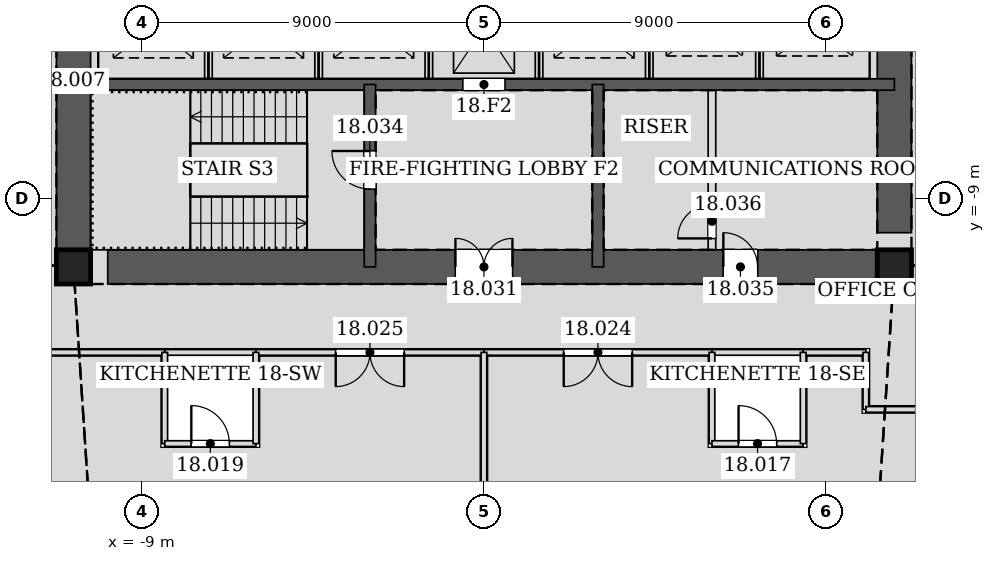
"""IFC4 building model, lengths in metres.
Left out: names, types, materials, properties, quantities, classifications, styles, units other than length and angle.
Written with IfcOpenShell. Run it as: python <this file> out.ifc"""

import sys

from ifc_helpers import new_model, si_unit, direction, frame, frame_2d, origin, origin_2d, place, context, subcontext, project, spatial, rectangle, hollow_rectangle, extrude, element, fill, save


model = new_model("IFC4")
c1 = context("Model", 3, precision=1e-05, world=origin(), true_north=direction((0.0, 1.0)))
c2 = subcontext(c1, "Body", "Model", "MODEL_VIEW")
j1 = project(units=[si_unit("LENGTHUNIT", "METRE"), si_unit("PLANEANGLEUNIT", "RADIAN")], contexts=[c1])
p1 = place(None, origin())
s1 = spatial("IfcSite", under=j1, at=p1, CompositionType="ELEMENT")
p2 = place(p1, origin())
s2 = spatial("IfcBuilding", under=s1, at=p2, CompositionType="ELEMENT")
p3 = place(p2, frame((0.0, 0.0, 83.4)))
s3 = spatial("IfcBuildingStorey", under=s2, at=p3, CompositionType="ELEMENT", Elevation=83.4)
for number, where, z_axis, x_axis in (
    (1, (-10.8, -10.8, 0.0), (0.0, 0.0, 1.0), (1.0, 0.0, 0.0)),
    (2, (10.8, -10.8, 0.0), (0.0, 0.0, 1.0), (1.0, 0.0, 0.0)),
):
    element("IfcColumn", number, at=place(p3, frame(where, z_axis=z_axis, x_axis=x_axis)), inside=s3, PredefinedType="COLUMN", context=c2, shape_type="SweptSolid", body=[
        extrude(hollow_rectangle(XDim=0.9, YDim=0.9, WallThickness=0.06, at=origin_2d()), origin(), (0.0, 0.0, 1.0), 4.2),
    ])
p4 = place(p3, frame((-10.8, -10.8, 0.0), z_axis=(0.0, 0.0, 1.0), x_axis=(1.0, 0.0, 0.0)))
e3 = element("IfcWall", 3, at=p4, inside=s3, PredefinedType="SOLIDWALL", context=c2, shape_type="SweptSolid", body=[
    extrude(rectangle(XDim=21.6, YDim=0.9, at=frame_2d((10.8, 0.0))), origin(), (0.0, 0.0, 1.0), 4.2),
])
p5 = place(p4, frame((10.05, 0.0, 0.0)))
e4 = element("IfcOpeningElement", 4, at=p5, cuts=e3, PredefinedType="OPENING", context=c2, shape_type="SweptSolid", body=[
    extrude(rectangle(XDim=1.5, YDim=2.1, at=frame_2d((0.75, 1.05))), frame((0.0, 0.46, 0.0), z_axis=(0.0, -1.0, 0.0), x_axis=(1.0, 0.0, 0.0)), (0.0, 0.0, 1.0), 0.92),
])
p6 = place(p4, frame((17.1, 0.0, 0.0)))
e5 = element("IfcOpeningElement", 5, at=p6, cuts=e3, PredefinedType="OPENING", context=c2, shape_type="SweptSolid", body=[
    extrude(rectangle(XDim=0.9, YDim=2.1, at=frame_2d((0.45, 1.05))), frame((0.0, 0.46, 0.0), z_axis=(0.0, -1.0, 0.0), x_axis=(1.0, 0.0, 0.0)), (0.0, 0.0, 1.0), 0.92),
])
p7 = place(p3, frame((10.8, -10.8, 0.0), z_axis=(0.0, 0.0, 1.0), x_axis=(0.0, 1.0, 0.0)))
e6 = element("IfcWall", 6, at=p7, inside=s3, PredefinedType="SOLIDWALL", context=c2, shape_type="SweptSolid", body=[
    extrude(rectangle(XDim=21.6, YDim=0.9, at=frame_2d((10.8, 0.0))), origin(), (0.0, 0.0, 1.0), 4.2),
])
p8 = place(p7, frame((11.7, 0.0, 0.0)))
e7 = element("IfcOpeningElement", 7, at=p8, cuts=e6, PredefinedType="OPENING", context=c2, shape_type="SweptSolid", body=[
    extrude(rectangle(XDim=1.2, YDim=2.1, at=frame_2d((0.6, 1.05))), frame((0.0, 0.46, 0.0), z_axis=(0.0, -1.0, 0.0), x_axis=(1.0, 0.0, 0.0)), (0.0, 0.0, 1.0), 0.92),
])
p9 = place(p7, frame((8.7, 0.0, 0.0)))
e8 = element("IfcOpeningElement", 8, at=p9, cuts=e6, PredefinedType="OPENING", context=c2, shape_type="SweptSolid", body=[
    extrude(rectangle(XDim=1.2, YDim=2.1, at=frame_2d((0.6, 1.05))), frame((0.0, 0.46, 0.0), z_axis=(0.0, -1.0, 0.0), x_axis=(1.0, 0.0, 0.0)), (0.0, 0.0, 1.0), 0.92),
])
p10 = place(p3, frame((-10.8, 10.8, 0.0), z_axis=(0.0, 0.0, 1.0), x_axis=(0.0, -1.0, 0.0)))
e9 = element("IfcWall", 9, at=p10, inside=s3, PredefinedType="SOLIDWALL", context=c2, shape_type="SweptSolid", body=[
    extrude(rectangle(XDim=21.6, YDim=0.9, at=frame_2d((10.8, 0.0))), origin(), (0.0, 0.0, 1.0), 4.2),
])
p11 = place(p10, frame((8.7, 0.0, 0.0)))
e10 = element("IfcOpeningElement", 10, at=p11, cuts=e9, PredefinedType="OPENING", context=c2, shape_type="SweptSolid", body=[
    extrude(rectangle(XDim=1.2, YDim=2.1, at=frame_2d((0.6, 1.05))), frame((0.0, 0.46, 0.0), z_axis=(0.0, -1.0, 0.0), x_axis=(1.0, 0.0, 0.0)), (0.0, 0.0, 1.0), 0.92),
])
p12 = place(p10, frame((11.7, 0.0, 0.0)))
e11 = element("IfcOpeningElement", 11, at=p12, cuts=e9, PredefinedType="OPENING", context=c2, shape_type="SweptSolid", body=[
    extrude(rectangle(XDim=1.2, YDim=2.1, at=frame_2d((0.6, 1.05))), frame((0.0, 0.46, 0.0), z_axis=(0.0, -1.0, 0.0), x_axis=(1.0, 0.0, 0.0)), (0.0, 0.0, 1.0), 0.92),
])
p13 = place(p3, frame((-10.8, -6.0, 0.0), z_axis=(0.0, 0.0, 1.0), x_axis=(1.0, 0.0, 0.0)))
e12 = element("IfcWall", 12, at=p13, inside=s3, PredefinedType="SOLIDWALL", context=c2, shape_type="SweptSolid", body=[
    extrude(rectangle(XDim=21.6, YDim=0.3, at=frame_2d((10.8, 0.0))), origin(), (0.0, 0.0, 1.0), 4.2),
])
p14 = place(p13, frame((10.25, 0.0, 0.0)))
e13 = element("IfcOpeningElement", 13, at=p14, cuts=e12, PredefinedType="OPENING", context=c2, shape_type="SweptSolid", body=[
    extrude(rectangle(XDim=1.1, YDim=2.1, at=frame_2d((0.55, 1.05))), frame((0.0, 0.16, 0.0), z_axis=(0.0, -1.0, 0.0), x_axis=(1.0, 0.0, 0.0)), (0.0, 0.0, 1.0), 0.32),
])
p15 = place(p3, frame((-3.0, -6.0, 0.0), z_axis=(0.0, 0.0, 1.0), x_axis=(0.0, -1.0, 0.0)))
e14 = element("IfcWall", 14, at=p15, inside=s3, PredefinedType="SOLIDWALL", context=c2, shape_type="SweptSolid", body=[
    extrude(rectangle(XDim=4.8, YDim=0.3, at=frame_2d((2.4, 0.0))), origin(), (0.0, 0.0, 1.0), 4.2),
])
p16 = place(p15, frame((1.75, 0.0, 0.0)))
e15 = element("IfcOpeningElement", 15, at=p16, cuts=e14, PredefinedType="OPENING", context=c2, shape_type="SweptSolid", body=[
    extrude(rectangle(XDim=1.0, YDim=2.1, at=frame_2d((0.5, 1.05))), frame((0.0, 0.16, 0.0), z_axis=(0.0, -1.0, 0.0), x_axis=(1.0, 0.0, 0.0)), (0.0, 0.0, 1.0), 0.32),
])
p17 = place(p3, frame((3.0, -6.0, 0.0), z_axis=(0.0, 0.0, 1.0), x_axis=(0.0, -1.0, 0.0)))
e16 = element("IfcWall", 16, at=p17, inside=s3, PredefinedType="SOLIDWALL", context=c2, shape_type="SweptSolid", body=[
    extrude(rectangle(XDim=4.8, YDim=0.3, at=frame_2d((2.4, 0.0))), origin(), (0.0, 0.0, 1.0), 4.2),
])
for number, where, z_axis, x_axis in (
    (17, (5.999, -13.05, 0.0), (0.0, 0.0, 1.0), (1.0, 0.0, 0.0)),
    (18, (-8.401, -13.05, 0.0), (0.0, 0.0, 1.0), (1.0, 0.0, 0.0)),
):
    element("IfcWall", number, at=place(p3, frame(where, z_axis=z_axis, x_axis=x_axis)), inside=s3, PredefinedType="PARTITIONING", context=c2, shape_type="SweptSolid", body=[
        extrude(rectangle(XDim=2.402, YDim=0.15, at=frame_2d((1.201, 0.0))), origin(), (0.0, 0.0, 1.0), 4.035),
    ])
p18 = place(p3, frame((-0.001, -13.05, 0.0), z_axis=(0.0, 0.0, 1.0), x_axis=(1.0, 0.0, 0.0)))
e19 = element("IfcWall", 19, at=p18, inside=s3, PredefinedType="PARTITIONING", context=c2, shape_type="SweptSolid", body=[
    extrude(rectangle(XDim=6.002, YDim=0.15, at=frame_2d((3.001, 0.0))), origin(), (0.0, 0.0, 1.0), 3.065),
])
p19 = place(p18, frame((2.101, 0.0, 0.0)))
e20 = element("IfcOpeningElement", 20, at=p19, cuts=e19, PredefinedType="OPENING", context=c2, shape_type="SweptSolid", body=[
    extrude(rectangle(XDim=1.8, YDim=2.4, at=frame_2d((0.9, 1.2))), frame((0.0, 0.085, 0.0), z_axis=(0.0, -1.0, 0.0), x_axis=(1.0, 0.0, 0.0)), (0.0, 0.0, 1.0), 0.17),
])
p20 = place(p3, frame((8.399, -13.05, 0.0), z_axis=(0.0, 0.0, 1.0), x_axis=(1.0, 0.0, 0.0)))
e21 = element("IfcWall", 21, at=p20, inside=s3, PredefinedType="PARTITIONING", context=c2, shape_type="SweptSolid", body=[
    extrude(rectangle(XDim=1.651, YDim=0.15, at=frame_2d((0.826, 0.0))), origin(), (0.0, 0.0, 1.0), 4.035),
])
p21 = place(p3, frame((10.05, -13.05, 0.0), z_axis=(0.0, 0.0, 1.0), x_axis=(0.0, -1.0, 0.0)))
e22 = element("IfcWall", 22, at=p21, inside=s3, PredefinedType="PARTITIONING", context=c2, shape_type="SweptSolid", body=[
    extrude(rectangle(XDim=1.5, YDim=0.15, at=frame_2d((0.75, 0.0))), origin(), (0.0, 0.0, 1.0), 3.492),
])
p22 = place(p3, frame((10.05, -14.55, 0.0), z_axis=(0.0, 0.0, 1.0), x_axis=(1.0, 0.0, 0.0)))
e23 = element("IfcWall", 23, at=p22, inside=s3, PredefinedType="PARTITIONING", context=c2, shape_type="SweptSolid", body=[
    extrude(rectangle(XDim=4.5, YDim=0.15, at=frame_2d((2.25, 0.0))), origin(), (0.0, 0.0, 1.0), 3.014),
])
p23 = place(p3, frame((-13.05, -13.05, 0.0), z_axis=(0.0, 0.0, 1.0), x_axis=(1.0, 0.0, 0.0)))
e24 = element("IfcWall", 24, at=p23, inside=s3, PredefinedType="PARTITIONING", context=c2, shape_type="SweptSolid", body=[
    extrude(rectangle(XDim=4.651, YDim=0.15, at=frame_2d((2.326, 0.0))), origin(), (0.0, 0.0, 1.0), 3.014),
])
p24 = place(p3, frame((-6.001, -13.05, 0.0), z_axis=(0.0, 0.0, 1.0), x_axis=(1.0, 0.0, 0.0)))
e25 = element("IfcWall", 25, at=p24, inside=s3, PredefinedType="PARTITIONING", context=c2, shape_type="SweptSolid", body=[
    extrude(rectangle(XDim=6.002, YDim=0.15, at=frame_2d((3.001, 0.0))), origin(), (0.0, 0.0, 1.0), 3.065),
])
p25 = place(p24, frame((2.101, 0.0, 0.0)))
e26 = element("IfcOpeningElement", 26, at=p25, cuts=e25, PredefinedType="OPENING", context=c2, shape_type="SweptSolid", body=[
    extrude(rectangle(XDim=1.8, YDim=2.4, at=frame_2d((0.9, 1.2))), frame((0.0, 0.085, 0.0), z_axis=(0.0, -1.0, 0.0), x_axis=(1.0, 0.0, 0.0)), (0.0, 0.0, 1.0), 0.17),
])
p26 = place(p3, frame((6.0, -13.05, 0.0), z_axis=(0.0, 0.0, 1.0), x_axis=(0.0, -1.0, 0.0)))
e27 = element("IfcWall", 27, at=p26, inside=s3, PredefinedType="PARTITIONING", context=c2, shape_type="SweptSolid", body=[
    extrude(rectangle(XDim=2.4, YDim=0.15, at=frame_2d((1.2, 0.0))), origin(), (0.0, 0.0, 1.0), 3.492),
])
p27 = place(p3, frame((6.0, -15.45, 0.0), z_axis=(0.0, 0.0, 1.0), x_axis=(1.0, 0.0, 0.0)))
e28 = element("IfcWall", 28, at=p27, inside=s3, PredefinedType="PARTITIONING", context=c2, shape_type="SweptSolid", body=[
    extrude(rectangle(XDim=2.4, YDim=0.15, at=frame_2d((1.2, 0.0))), origin(), (0.0, 0.0, 1.0), 4.035),
])
p28 = place(p27, frame((0.7, 0.0, 0.0)))
e29 = element("IfcOpeningElement", 29, at=p28, cuts=e28, PredefinedType="OPENING", context=c2, shape_type="SweptSolid", body=[
    extrude(rectangle(XDim=1.0, YDim=2.1, at=frame_2d((0.5, 1.05))), frame((0.0, 0.085, 0.0), z_axis=(0.0, -1.0, 0.0), x_axis=(1.0, 0.0, 0.0)), (0.0, 0.0, 1.0), 0.17),
])
for number, where, z_axis, x_axis in (
    (30, (8.4, -15.45, 0.0), (0.0, 0.0, 1.0), (0.0, 1.0, 0.0)),
    (31, (-8.4, -13.05, 0.0), (0.0, 0.0, 1.0), (0.0, -1.0, 0.0)),
):
    element("IfcWall", number, at=place(p3, frame(where, z_axis=z_axis, x_axis=x_axis)), inside=s3, PredefinedType="PARTITIONING", context=c2, shape_type="SweptSolid", body=[
        extrude(rectangle(XDim=2.4, YDim=0.15, at=frame_2d((1.2, 0.0))), origin(), (0.0, 0.0, 1.0), 3.492),
    ])
p29 = place(p3, frame((-8.4, -15.45, 0.0), z_axis=(0.0, 0.0, 1.0), x_axis=(1.0, 0.0, 0.0)))
e32 = element("IfcWall", 32, at=p29, inside=s3, PredefinedType="PARTITIONING", context=c2, shape_type="SweptSolid", body=[
    extrude(rectangle(XDim=2.4, YDim=0.15, at=frame_2d((1.2, 0.0))), origin(), (0.0, 0.0, 1.0), 4.035),
])
p30 = place(p29, frame((0.7, 0.0, 0.0)))
e33 = element("IfcOpeningElement", 33, at=p30, cuts=e32, PredefinedType="OPENING", context=c2, shape_type="SweptSolid", body=[
    extrude(rectangle(XDim=1.0, YDim=2.1, at=frame_2d((0.5, 1.05))), frame((0.0, 0.085, 0.0), z_axis=(0.0, -1.0, 0.0), x_axis=(1.0, 0.0, 0.0)), (0.0, 0.0, 1.0), 0.17),
])
p31 = place(p3, frame((-6.0, -15.45, 0.0), z_axis=(0.0, 0.0, 1.0), x_axis=(0.0, 1.0, 0.0)))
e34 = element("IfcWall", 34, at=p31, inside=s3, PredefinedType="PARTITIONING", context=c2, shape_type="SweptSolid", body=[
    extrude(rectangle(XDim=2.4, YDim=0.15, at=frame_2d((1.2, 0.0))), origin(), (0.0, 0.0, 1.0), 3.492),
])
p32 = place(p3, frame((0.0, -13.05, 0.0), z_axis=(0.0, 0.0, 1.0), x_axis=(0.0, -1.0, 0.0)))
e35 = element("IfcWall", 35, at=p32, inside=s3, PredefinedType="PARTITIONING", context=c2, shape_type="SweptSolid", body=[
    extrude(rectangle(XDim=11.417, YDim=0.15, at=frame_2d((5.709, 0.0))), origin(), (0.0, 0.0, 1.0), 3.065),
])
for number, where, z_axis, x_axis in (
    (36, (-7.25, -5.85, 0.0), (0.0, 0.0, 1.0), (0.0, 1.0, 0.0)),
    (37, (-4.35, -5.85, 0.0), (0.0, 0.0, 1.0), (0.0, 1.0, 0.0)),
    (38, (-1.45, -5.85, 0.0), (0.0, 0.0, 1.0), (0.0, 1.0, 0.0)),
    (39, (1.45, -5.85, 0.0), (0.0, 0.0, 1.0), (0.0, 1.0, 0.0)),
    (40, (4.35, -5.85, 0.0), (0.0, 0.0, 1.0), (0.0, 1.0, 0.0)),
    (41, (7.25, -5.85, 0.0), (0.0, 0.0, 1.0), (0.0, 1.0, 0.0)),
):
    element("IfcWall", number, at=place(p3, frame(where, z_axis=z_axis, x_axis=x_axis)), inside=s3, PredefinedType="PARTITIONING", context=c2, shape_type="SweptSolid", body=[
        extrude(rectangle(XDim=2.7, YDim=0.2, at=frame_2d((1.35, 0.0))), origin(), (0.0, 0.0, 1.0), 4.2),
    ])
p33 = place(p3, frame((6.0, -10.35, 0.0), z_axis=(0.0, 0.0, 1.0), x_axis=(0.0, 1.0, 0.0)))
e42 = element("IfcWall", 42, at=p33, inside=s3, PredefinedType="PARTITIONING", context=c2, shape_type="SweptSolid", body=[
    extrude(rectangle(XDim=4.2, YDim=0.2, at=frame_2d((2.1, 0.0))), origin(), (0.0, 0.0, 1.0), 4.035),
])
p34 = place(p33, frame((0.3, 0.0, 0.0)))
e43 = element("IfcOpeningElement", 43, at=p34, cuts=e42, PredefinedType="OPENING", context=c2, shape_type="SweptSolid", body=[
    extrude(rectangle(XDim=0.9, YDim=2.1, at=frame_2d((0.45, 1.05))), frame((0.0, 0.11, 0.0), z_axis=(0.0, -1.0, 0.0), x_axis=(1.0, 0.0, 0.0)), (0.0, 0.0, 1.0), 0.22),
])
p35 = place(p28, origin())
e44 = element("IfcDoor", 44, at=p35, inside=s3, OperationType="SINGLE_SWING_LEFT", PredefinedType="DOOR", context=c2, shape_type="SweptSolid", body=[
    extrude(rectangle(XDim=1.0, YDim=2.1, at=frame_2d((0.5, 1.05))), frame((0.0, 0.025, 0.0), z_axis=(0.0, -1.0, 0.0), x_axis=(1.0, 0.0, 0.0)), (0.0, 0.0, 1.0), 0.05),
])
fill(e29, e44)
p36 = place(p30, origin())
e45 = element("IfcDoor", 45, at=p36, inside=s3, OperationType="SINGLE_SWING_LEFT", PredefinedType="DOOR", context=c2, shape_type="SweptSolid", body=[
    extrude(rectangle(XDim=1.0, YDim=2.1, at=frame_2d((0.5, 1.05))), frame((0.0, 0.025, 0.0), z_axis=(0.0, -1.0, 0.0), x_axis=(1.0, 0.0, 0.0)), (0.0, 0.0, 1.0), 0.05),
])
fill(e33, e45)
p37 = place(p19, frame((1.8, 0.0, 0.0), z_axis=(0.0, 0.0, 1.0), x_axis=(-1.0, 0.0, 0.0)))
e46 = element("IfcDoor", 46, at=p37, inside=s3, OperationType="DOUBLE_DOOR_SINGLE_SWING", PredefinedType="DOOR", context=c2, shape_type="SweptSolid", body=[
    extrude(rectangle(XDim=1.8, YDim=2.4, at=frame_2d((0.9, 1.2))), frame((0.0, 0.025, 0.0), z_axis=(0.0, -1.0, 0.0), x_axis=(1.0, 0.0, 0.0)), (0.0, 0.0, 1.0), 0.05),
])
fill(e20, e46)
p38 = place(p25, frame((1.8, 0.0, 0.0), z_axis=(0.0, 0.0, 1.0), x_axis=(-1.0, 0.0, 0.0)))
e47 = element("IfcDoor", 47, at=p38, inside=s3, OperationType="DOUBLE_DOOR_SINGLE_SWING", PredefinedType="DOOR", context=c2, shape_type="SweptSolid", body=[
    extrude(rectangle(XDim=1.8, YDim=2.4, at=frame_2d((0.9, 1.2))), frame((0.0, 0.025, 0.0), z_axis=(0.0, -1.0, 0.0), x_axis=(1.0, 0.0, 0.0)), (0.0, 0.0, 1.0), 0.05),
])
fill(e26, e47)
p39 = place(p5, origin())
e48 = element("IfcDoor", 48, at=p39, inside=s3, OperationType="DOUBLE_DOOR_SINGLE_SWING", PredefinedType="DOOR", context=c2, shape_type="SweptSolid", body=[
    extrude(rectangle(XDim=1.5, YDim=2.1, at=frame_2d((0.75, 1.05))), frame((0.0, 0.025, 0.0), z_axis=(0.0, -1.0, 0.0), x_axis=(1.0, 0.0, 0.0)), (0.0, 0.0, 1.0), 0.05),
])
fill(e4, e48)
p40 = place(p16, frame((1.0, 0.0, 0.0), z_axis=(0.0, 0.0, 1.0), x_axis=(-1.0, 0.0, 0.0)))
e49 = element("IfcDoor", 49, at=p40, inside=s3, OperationType="SINGLE_SWING_RIGHT", PredefinedType="DOOR", context=c2, shape_type="SweptSolid", body=[
    extrude(rectangle(XDim=1.0, YDim=2.1, at=frame_2d((0.5, 1.05))), frame((0.0, 0.025, 0.0), z_axis=(0.0, -1.0, 0.0), x_axis=(1.0, 0.0, 0.0)), (0.0, 0.0, 1.0), 0.05),
])
fill(e15, e49)
p41 = place(p6, origin())
e50 = element("IfcDoor", 50, at=p41, inside=s3, OperationType="SINGLE_SWING_LEFT", PredefinedType="DOOR", context=c2, shape_type="SweptSolid", body=[
    extrude(rectangle(XDim=0.9, YDim=2.1, at=frame_2d((0.45, 1.05))), frame((0.0, 0.025, 0.0), z_axis=(0.0, -1.0, 0.0), x_axis=(1.0, 0.0, 0.0)), (0.0, 0.0, 1.0), 0.05),
])
fill(e5, e50)
p42 = place(p34, origin())
e51 = element("IfcDoor", 51, at=p42, inside=s3, OperationType="SINGLE_SWING_LEFT", PredefinedType="DOOR", context=c2, shape_type="SweptSolid", body=[
    extrude(rectangle(XDim=0.9, YDim=2.1, at=frame_2d((0.45, 1.05))), frame((0.0, 0.025, 0.0), z_axis=(0.0, -1.0, 0.0), x_axis=(1.0, 0.0, 0.0)), (0.0, 0.0, 1.0), 0.05),
])
fill(e43, e51)
p43 = place(p14, origin())
e52 = element("IfcDoor", 52, at=p43, inside=s3, OperationType="DOUBLE_DOOR_SLIDING", PredefinedType="DOOR", context=c2, shape_type="SweptSolid", body=[
    extrude(rectangle(XDim=1.1, YDim=2.1, at=frame_2d((0.55, 1.05))), frame((0.0, 0.025, 0.0), z_axis=(0.0, -1.0, 0.0), x_axis=(1.0, 0.0, 0.0)), (0.0, 0.0, 1.0), 0.05),
])
fill(e13, e52)
save(model, sys.argv[1])
